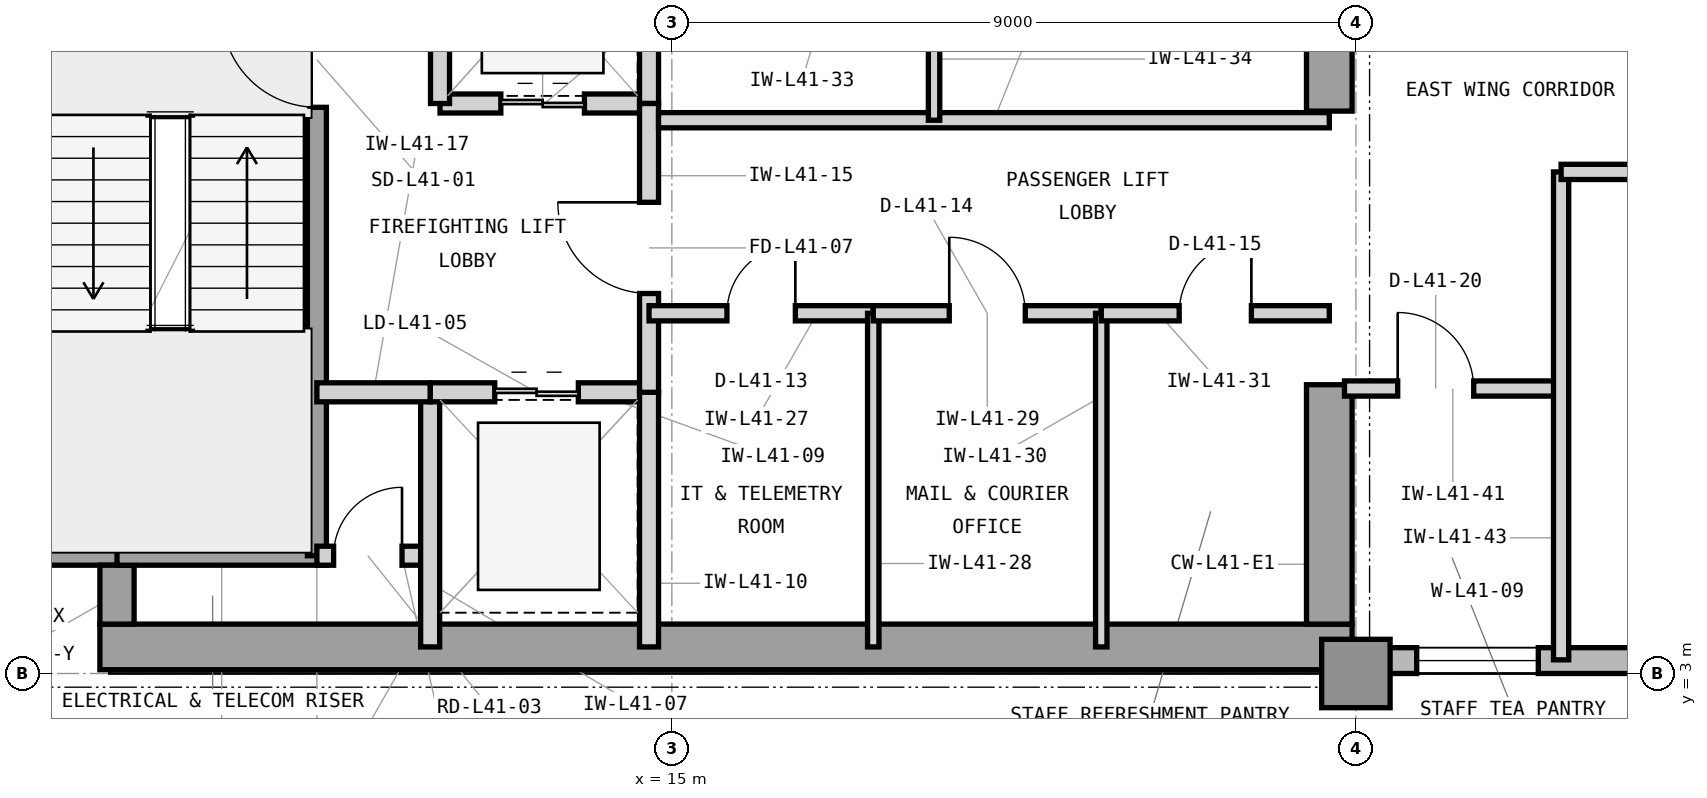
"""IFC4 building model, lengths in metres.
Left out: names, types, materials, properties, quantities, classifications, styles, units other than length and angle.
Written with IfcOpenShell. Run it as: python <this file> out.ifc"""

import sys

from ifc_helpers import new_model, si_unit, direction, frame, frame_2d, origin, origin_2d, place, context, subcontext, project, spatial, rectangle, extrude, element, fill, save


model = new_model("IFC4")
c1 = context("Model", 3, precision=1e-05, world=origin(), true_north=direction((0.0, 1.0)))
c2 = subcontext(c1, "Body", "Model", "MODEL_VIEW")
j1 = project(units=[si_unit("LENGTHUNIT", "METRE"), si_unit("PLANEANGLEUNIT", "RADIAN")], contexts=[c1])
p1 = place(None, origin())
s1 = spatial("IfcSite", under=j1, at=p1, CompositionType="ELEMENT")
p2 = place(p1, origin())
s2 = spatial("IfcBuilding", under=s1, at=p2, CompositionType="ELEMENT")
p3 = place(p2, frame((0.0, 0.0, 172.2)))
s3 = spatial("IfcBuildingStorey", under=s2, at=p3, CompositionType="ELEMENT", Elevation=172.2)
p4 = place(p3, frame((7.475, 3.35, 0.0), z_axis=(0.0, 0.0, 1.0), x_axis=(1.0, 0.0, 0.0)))
e1 = element("IfcWall", 1, at=p4, inside=s3, PredefinedType="SHEAR", context=c2, shape_type="SweptSolid", body=[
    extrude(rectangle(XDim=16.475, YDim=0.6, at=frame_2d((8.237, 0.0))), origin(), (0.0, 0.0, 1.0), 3.9),
])
p5 = place(p3, frame((23.65, 3.65, 0.0), z_axis=(0.0, 0.0, 1.0), x_axis=(0.0, 1.0, 0.0)))
e2 = element("IfcWall", 2, at=p5, inside=s3, PredefinedType="SHEAR", context=c2, shape_type="SweptSolid", body=[
    extrude(rectangle(XDim=3.15, YDim=0.6, at=frame_2d((1.575, 0.0))), origin(), (0.0, 0.0, 1.0), 3.9),
])
p6 = place(p3, frame((23.65, 10.4, 0.0), z_axis=(0.0, 0.0, 1.0), x_axis=(0.0, 1.0, 0.0)))
e3 = element("IfcWall", 3, at=p6, inside=s3, PredefinedType="SHEAR", context=c2, shape_type="SweptSolid", body=[
    extrude(rectangle(XDim=3.2, YDim=0.6, at=frame_2d((1.6, 0.0))), origin(), (0.0, 0.0, 1.0), 3.9),
])
p7 = place(p3, frame((6.65, 4.65, 0.0), z_axis=(0.0, 0.0, 1.0), x_axis=(1.0, 0.0, 0.0)))
e4 = element("IfcWall", 4, at=p7, inside=s3, PredefinedType="SHEAR", context=c2, shape_type="SweptSolid", body=[
    extrude(rectangle(XDim=1.275, YDim=0.45, at=frame_2d((0.638, 0.0))), origin(), (0.0, 0.0, 1.0), 3.9),
])
p8 = place(p3, frame((7.7, 3.65, 0.0), z_axis=(0.0, 0.0, 1.0), x_axis=(0.0, 1.0, 0.0)))
e5 = element("IfcWall", 5, at=p8, inside=s3, PredefinedType="SHEAR", context=c2, shape_type="SweptSolid", body=[
    extrude(rectangle(XDim=0.775, YDim=0.45, at=frame_2d((0.388, 0.0))), origin(), (0.0, 0.0, 1.0), 3.9),
])
p9 = place(p3, frame((24.0, 3.0, 0.0), z_axis=(0.0, 0.0, 1.0), x_axis=(1.0, 0.0, 0.0)))
e6 = element("IfcColumn", 6, at=p9, inside=s3, PredefinedType="COLUMN", context=c2, shape_type="SweptSolid", body=[
    extrude(rectangle(XDim=0.9, YDim=0.9, at=origin_2d()), origin(), (0.0, 0.0, 1.0), 3.9),
])
p10 = place(p3, frame((23.9, 3.17, 0.0), z_axis=(0.0, 0.0, 1.0), x_axis=(1.0, 0.0, 0.0)))
e7 = element("IfcWall", 7, at=p10, inside=s3, PredefinedType="STANDARD", context=c2, shape_type="SweptSolid", body=[
    extrude(rectangle(XDim=31.5, YDim=0.34, at=frame_2d((15.75, 0.0))), origin(), (0.0, 0.0, 1.0), 3.7),
])
p11 = place(p10, frame((5.6, 0.0, 0.9)))
e8 = element("IfcOpeningElement", 8, at=p11, cuts=e7, PredefinedType="OPENING", context=c2, shape_type="SweptSolid", body=[
    extrude(rectangle(XDim=2.3, YDim=2.2, at=frame_2d((1.15, 1.1))), frame((0.0, 0.18, 0.0), z_axis=(0.0, -1.0, 0.0), x_axis=(1.0, 0.0, 0.0)), (0.0, 0.0, 1.0), 0.36),
])
p12 = place(p10, frame((10.1, 0.0, 0.9)))
e9 = element("IfcOpeningElement", 9, at=p12, cuts=e7, PredefinedType="OPENING", context=c2, shape_type="SweptSolid", body=[
    extrude(rectangle(XDim=2.3, YDim=2.2, at=frame_2d((1.15, 1.1))), frame((0.0, 0.18, 0.0), z_axis=(0.0, -1.0, 0.0), x_axis=(1.0, 0.0, 0.0)), (0.0, 0.0, 1.0), 0.36),
])
p13 = place(p10, frame((19.1, 0.0, 0.9)))
e10 = element("IfcOpeningElement", 10, at=p13, cuts=e7, PredefinedType="OPENING", context=c2, shape_type="SweptSolid", body=[
    extrude(rectangle(XDim=2.3, YDim=2.2, at=frame_2d((1.15, 1.1))), frame((0.0, 0.18, 0.0), z_axis=(0.0, -1.0, 0.0), x_axis=(1.0, 0.0, 0.0)), (0.0, 0.0, 1.0), 0.36),
])
p14 = place(p10, frame((0.9, 0.0, 0.9)))
e11 = element("IfcOpeningElement", 11, at=p14, cuts=e7, PredefinedType="OPENING", context=c2, shape_type="SweptSolid", body=[
    extrude(rectangle(XDim=1.6, YDim=2.2, at=frame_2d((0.8, 1.1))), frame((0.0, 0.18, 0.0), z_axis=(0.0, -1.0, 0.0), x_axis=(1.0, 0.0, 0.0)), (0.0, 0.0, 1.0), 0.36),
])
p15 = place(p3, frame((7.7, 4.55, 0.0), z_axis=(0.0, 0.0, 1.0), x_axis=(1.0, 0.0, 0.0)))
e12 = element("IfcWall", 12, at=p15, inside=s3, PredefinedType="SHEAR", context=c2, shape_type="SweptSolid", body=[
    extrude(rectangle(XDim=2.755, YDim=0.25, at=frame_2d((1.377, 0.0))), origin(), (0.0, 0.0, 1.0), 3.9),
])
p16 = place(p3, frame((10.33, 4.55, 0.0), z_axis=(0.0, 0.0, 1.0), x_axis=(0.0, 1.0, 0.0)))
e13 = element("IfcWall", 13, at=p16, inside=s3, PredefinedType="SHEAR", context=c2, shape_type="SweptSolid", body=[
    extrude(rectangle(XDim=7.45, YDim=0.25, at=frame_2d((3.725, 0.0))), origin(), (0.0, 0.0, 1.0), 3.9),
])
p17 = place(p16, frame((5.9, 0.0, 0.0)))
e14 = element("IfcOpeningElement", 14, at=p17, cuts=e13, PredefinedType="OPENING", context=c2, shape_type="SweptSolid", body=[
    extrude(rectangle(XDim=1.25, YDim=2.2, at=frame_2d((0.625, 1.1))), frame((0.0, 0.135, 0.0), z_axis=(0.0, -1.0, 0.0), x_axis=(1.0, 0.0, 0.0)), (0.0, 0.0, 1.0), 0.27),
])
p18 = place(p3, frame((10.33, 4.55, 0.0), z_axis=(0.0, 0.0, 1.0), x_axis=(1.0, 0.0, 0.0)))
e15 = element("IfcWall", 15, at=p18, inside=s3, PredefinedType="PARTITIONING", context=c2, shape_type="SweptSolid", body=[
    extrude(rectangle(XDim=1.49, YDim=0.25, at=frame_2d((0.745, 0.0))), origin(), (0.0, 0.0, 1.0), 3.69),
])
p19 = place(p18, frame((0.22, 0.0, 0.0)))
e16 = element("IfcOpeningElement", 16, at=p19, cuts=e15, PredefinedType="OPENING", context=c2, shape_type="SweptSolid", body=[
    extrude(rectangle(XDim=0.9, YDim=2.1, at=frame_2d((0.45, 1.05))), frame((0.0, 0.135, 0.0), z_axis=(0.0, -1.0, 0.0), x_axis=(1.0, 0.0, 0.0)), (0.0, 0.0, 1.0), 0.27),
])
p20 = place(p3, frame((11.82, 3.35, 0.0), z_axis=(0.0, 0.0, 1.0), x_axis=(0.0, 1.0, 0.0)))
e17 = element("IfcWall", 17, at=p20, inside=s3, PredefinedType="PARTITIONING", context=c2, shape_type="SweptSolid", body=[
    extrude(rectangle(XDim=3.35, YDim=0.25, at=frame_2d((1.675, 0.0))), origin(), (0.0, 0.0, 1.0), 3.69),
])
p21 = place(p3, frame((11.82, 6.7, 0.0), z_axis=(0.0, 0.0, 1.0), x_axis=(1.0, 0.0, 0.0)))
e18 = element("IfcWall", 18, at=p21, inside=s3, PredefinedType="PARTITIONING", context=c2, shape_type="SweptSolid", body=[
    extrude(rectangle(XDim=2.88, YDim=0.25, at=frame_2d((1.44, 0.0))), origin(), (0.0, 0.0, 1.0), 3.283),
])
p22 = place(p21, frame((0.85, 0.0, 0.0)))
e19 = element("IfcOpeningElement", 19, at=p22, cuts=e18, PredefinedType="OPENING", context=c2, shape_type="SweptSolid", body=[
    extrude(rectangle(XDim=1.1, YDim=2.25, at=frame_2d((0.55, 1.125))), frame((0.0, 0.135, 0.0), z_axis=(0.0, -1.0, 0.0), x_axis=(1.0, 0.0, 0.0)), (0.0, 0.0, 1.0), 0.27),
])
p23 = place(p3, frame((14.7, 3.35, 0.0), z_axis=(0.0, 0.0, 1.0), x_axis=(0.0, 1.0, 0.0)))
e20 = element("IfcWall", 20, at=p23, inside=s3, PredefinedType="PARTITIONING", context=c2, shape_type="SweptSolid", body=[
    extrude(rectangle(XDim=3.35, YDim=0.25, at=frame_2d((1.675, 0.0))), origin(), (0.0, 0.0, 1.0), 3.69),
])
p24 = place(p3, frame((11.95, 10.5, 0.0), z_axis=(0.0, 0.0, 1.0), x_axis=(1.0, 0.0, 0.0)))
e21 = element("IfcWall", 21, at=p24, inside=s3, PredefinedType="PARTITIONING", context=c2, shape_type="SweptSolid", body=[
    extrude(rectangle(XDim=2.75, YDim=0.25, at=frame_2d((1.375, 0.0))), origin(), (0.0, 0.0, 1.0), 3.283),
])
p25 = place(p24, frame((0.8, 0.0, 0.0)))
e22 = element("IfcOpeningElement", 22, at=p25, cuts=e21, PredefinedType="OPENING", context=c2, shape_type="SweptSolid", body=[
    extrude(rectangle(XDim=1.1, YDim=2.25, at=frame_2d((0.55, 1.125))), frame((0.0, 0.135, 0.0), z_axis=(0.0, -1.0, 0.0), x_axis=(1.0, 0.0, 0.0)), (0.0, 0.0, 1.0), 0.27),
])
for number, where, z_axis, x_axis in (
    (23, (11.95, 10.5, 0.0), (0.0, 0.0, 1.0), (0.0, 1.0, 0.0)),
    (24, (14.7, 10.5, 0.0), (0.0, 0.0, 1.0), (0.0, 1.0, 0.0)),
):
    element("IfcWall", number, at=place(p3, frame(where, z_axis=z_axis, x_axis=x_axis)), inside=s3, PredefinedType="PARTITIONING", context=c2, shape_type="SweptSolid", body=[
        extrude(rectangle(XDim=3.0, YDim=0.25, at=frame_2d((1.5, 0.0))), origin(), (0.0, 0.0, 1.0), 3.69),
    ])
p26 = place(p3, frame((14.7, 6.7, 0.0), z_axis=(0.0, 0.0, 1.0), x_axis=(0.0, 1.0, 0.0)))
e25 = element("IfcWall", 25, at=p26, inside=s3, PredefinedType="PARTITIONING", context=c2, shape_type="SweptSolid", body=[
    extrude(rectangle(XDim=3.8, YDim=0.25, at=frame_2d((1.9, 0.0))), origin(), (0.0, 0.0, 1.0), 3.69),
])
p27 = place(p26, frame((1.3, 0.0, 0.0)))
e26 = element("IfcOpeningElement", 26, at=p27, cuts=e25, PredefinedType="OPENING", context=c2, shape_type="SweptSolid", body=[
    extrude(rectangle(XDim=1.2, YDim=2.2, at=frame_2d((0.6, 1.1))), frame((0.0, 0.135, 0.0), z_axis=(0.0, -1.0, 0.0), x_axis=(1.0, 0.0, 0.0)), (0.0, 0.0, 1.0), 0.27),
])
p28 = place(p3, frame((10.33, 6.7, 0.0), z_axis=(0.0, 0.0, 1.0), x_axis=(1.0, 0.0, 0.0)))
e27 = element("IfcWall", 27, at=p28, inside=s3, PredefinedType="PARTITIONING", context=c2, shape_type="SweptSolid", body=[
    extrude(rectangle(XDim=1.49, YDim=0.25, at=frame_2d((0.745, 0.0))), origin(), (0.0, 0.0, 1.0), 3.283),
])
p29 = place(p3, frame((14.7, 7.74, 0.0), z_axis=(0.0, 0.0, 1.0), x_axis=(1.0, 0.0, 0.0)))
e28 = element("IfcWall", 28, at=p29, inside=s3, PredefinedType="PARTITIONING", context=c2, shape_type="SweptSolid", body=[
    extrude(rectangle(XDim=2.95, YDim=0.2, at=frame_2d((1.475, 0.0))), origin(), (0.0, 0.0, 1.0), 3.69),
])
p30 = place(p29, frame((1.025, 0.0, 0.0)))
e29 = element("IfcOpeningElement", 29, at=p30, cuts=e28, PredefinedType="OPENING", context=c2, shape_type="SweptSolid", body=[
    extrude(rectangle(XDim=0.9, YDim=2.1, at=frame_2d((0.45, 1.05))), frame((0.0, 0.11, 0.0), z_axis=(0.0, -1.0, 0.0), x_axis=(1.0, 0.0, 0.0)), (0.0, 0.0, 1.0), 0.22),
])
p31 = place(p3, frame((17.65, 3.35, 0.0), z_axis=(0.0, 0.0, 1.0), x_axis=(0.0, 1.0, 0.0)))
e30 = element("IfcWall", 30, at=p31, inside=s3, PredefinedType="PARTITIONING", context=c2, shape_type="SweptSolid", body=[
    extrude(rectangle(XDim=4.39, YDim=0.15, at=frame_2d((2.195, 0.0))), origin(), (0.0, 0.0, 1.0), 3.69),
])
p32 = place(p3, frame((17.65, 7.74, 0.0), z_axis=(0.0, 0.0, 1.0), x_axis=(1.0, 0.0, 0.0)))
e31 = element("IfcWall", 31, at=p32, inside=s3, PredefinedType="PARTITIONING", context=c2, shape_type="SweptSolid", body=[
    extrude(rectangle(XDim=3.0, YDim=0.2, at=frame_2d((1.5, 0.0))), origin(), (0.0, 0.0, 1.0), 3.69),
])
p33 = place(p32, frame((1.0, 0.0, 0.0)))
e32 = element("IfcOpeningElement", 32, at=p33, cuts=e31, PredefinedType="OPENING", context=c2, shape_type="SweptSolid", body=[
    extrude(rectangle(XDim=1.0, YDim=2.15, at=frame_2d((0.5, 1.075))), frame((0.0, 0.11, 0.0), z_axis=(0.0, -1.0, 0.0), x_axis=(1.0, 0.0, 0.0)), (0.0, 0.0, 1.0), 0.22),
])
p34 = place(p3, frame((20.65, 3.35, 0.0), z_axis=(0.0, 0.0, 1.0), x_axis=(0.0, 1.0, 0.0)))
e33 = element("IfcWall", 33, at=p34, inside=s3, PredefinedType="PARTITIONING", context=c2, shape_type="SweptSolid", body=[
    extrude(rectangle(XDim=4.39, YDim=0.15, at=frame_2d((2.195, 0.0))), origin(), (0.0, 0.0, 1.0), 3.69),
])
p35 = place(p3, frame((20.65, 7.74, 0.0), z_axis=(0.0, 0.0, 1.0), x_axis=(1.0, 0.0, 0.0)))
e34 = element("IfcWall", 34, at=p35, inside=s3, PredefinedType="PARTITIONING", context=c2, shape_type="SweptSolid", body=[
    extrude(rectangle(XDim=3.0, YDim=0.2, at=frame_2d((1.5, 0.0))), origin(), (0.0, 0.0, 1.0), 3.69),
])
p36 = place(p35, frame((1.025, 0.0, 0.0)))
e35 = element("IfcOpeningElement", 35, at=p36, cuts=e34, PredefinedType="OPENING", context=c2, shape_type="SweptSolid", body=[
    extrude(rectangle(XDim=0.95, YDim=2.1, at=frame_2d((0.475, 1.05))), frame((0.0, 0.11, 0.0), z_axis=(0.0, -1.0, 0.0), x_axis=(1.0, 0.0, 0.0)), (0.0, 0.0, 1.0), 0.22),
])
p37 = place(p3, frame((14.825, 10.28, 0.0), z_axis=(0.0, 0.0, 1.0), x_axis=(1.0, 0.0, 0.0)))
e36 = element("IfcWall", 36, at=p37, inside=s3, PredefinedType="PARTITIONING", context=c2, shape_type="SweptSolid", body=[
    extrude(rectangle(XDim=8.825, YDim=0.2, at=frame_2d((4.413, 0.0))), origin(), (0.0, 0.0, 1.0), 3.69),
])
p38 = place(p3, frame((18.45, 10.28, 0.0), z_axis=(0.0, 0.0, 1.0), x_axis=(0.0, 1.0, 0.0)))
e37 = element("IfcWall", 37, at=p38, inside=s3, PredefinedType="PARTITIONING", context=c2, shape_type="SweptSolid", body=[
    extrude(rectangle(XDim=3.22, YDim=0.15, at=frame_2d((1.61, 0.0))), origin(), (0.0, 0.0, 1.0), 3.69),
])
p39 = place(p3, frame((23.85, 6.75, 0.0), z_axis=(0.0, 0.0, 1.0), x_axis=(1.0, 0.0, 0.0)))
e38 = element("IfcWall", 38, at=p39, inside=s3, PredefinedType="PARTITIONING", context=c2, shape_type="SweptSolid", body=[
    extrude(rectangle(XDim=2.85, YDim=0.2, at=frame_2d((1.425, 0.0))), origin(), (0.0, 0.0, 1.0), 3.69),
])
p40 = place(p39, frame((0.7, 0.0, 0.0)))
e39 = element("IfcOpeningElement", 39, at=p40, cuts=e38, PredefinedType="OPENING", context=c2, shape_type="SweptSolid", body=[
    extrude(rectangle(XDim=1.0, YDim=2.15, at=frame_2d((0.5, 1.075))), frame((0.0, 0.11, 0.0), z_axis=(0.0, -1.0, 0.0), x_axis=(1.0, 0.0, 0.0)), (0.0, 0.0, 1.0), 0.22),
])
p41 = place(p3, frame((26.7, 3.18, 0.0), z_axis=(0.0, 0.0, 1.0), x_axis=(0.0, 1.0, 0.0)))
e40 = element("IfcWall", 40, at=p41, inside=s3, PredefinedType="PARTITIONING", context=c2, shape_type="SweptSolid", body=[
    extrude(rectangle(XDim=6.42, YDim=0.2, at=frame_2d((3.21, 0.0))), origin(), (0.0, 0.0, 1.0), 3.69),
])
p42 = place(p3, frame((26.7, 9.6, 0.0), z_axis=(0.0, 0.0, 1.0), x_axis=(1.0, 0.0, 0.0)))
e41 = element("IfcWall", 41, at=p42, inside=s3, PredefinedType="PARTITIONING", context=c2, shape_type="SweptSolid", body=[
    extrude(rectangle(XDim=12.0, YDim=0.2, at=frame_2d((6.0, 0.0))), origin(), (0.0, 0.0, 1.0), 3.69),
])
p43 = place(p42, frame((5.5, 0.0, 0.0)))
e42 = element("IfcOpeningElement", 42, at=p43, cuts=e41, PredefinedType="OPENING", context=c2, shape_type="SweptSolid", body=[
    extrude(rectangle(XDim=1.0, YDim=2.15, at=frame_2d((0.5, 1.075))), frame((0.0, 0.11, 0.0), z_axis=(0.0, -1.0, 0.0), x_axis=(1.0, 0.0, 0.0)), (0.0, 0.0, 1.0), 0.22),
])
p44 = place(p17, origin())
e43 = element("IfcDoor", 43, at=p44, inside=s3, OperationType="SINGLE_SWING_RIGHT", PredefinedType="DOOR", context=c2, shape_type="SweptSolid", body=[
    extrude(rectangle(XDim=1.25, YDim=2.2, at=frame_2d((0.625, 1.1))), frame((0.0, 0.025, 0.0), z_axis=(0.0, -1.0, 0.0), x_axis=(1.0, 0.0, 0.0)), (0.0, 0.0, 1.0), 0.05),
])
fill(e14, e43)
p45 = place(p19, origin())
e44 = element("IfcDoor", 44, at=p45, inside=s3, OperationType="SINGLE_SWING_RIGHT", PredefinedType="TRAPDOOR", context=c2, shape_type="SweptSolid", body=[
    extrude(rectangle(XDim=0.9, YDim=2.1, at=frame_2d((0.45, 1.05))), frame((0.0, 0.025, 0.0), z_axis=(0.0, -1.0, 0.0), x_axis=(1.0, 0.0, 0.0)), (0.0, 0.0, 1.0), 0.05),
])
fill(e16, e44)
p46 = place(p22, origin())
e45 = element("IfcDoor", 45, at=p46, inside=s3, OperationType="DOUBLE_DOOR_SLIDING", PredefinedType="DOOR", context=c2, shape_type="SweptSolid", body=[
    extrude(rectangle(XDim=1.1, YDim=2.25, at=frame_2d((0.55, 1.125))), frame((0.0, 0.025, 0.0), z_axis=(0.0, -1.0, 0.0), x_axis=(1.0, 0.0, 0.0)), (0.0, 0.0, 1.0), 0.05),
])
fill(e19, e45)
p47 = place(p25, origin())
e46 = element("IfcDoor", 46, at=p47, inside=s3, OperationType="DOUBLE_DOOR_SLIDING", PredefinedType="DOOR", context=c2, shape_type="SweptSolid", body=[
    extrude(rectangle(XDim=1.1, YDim=2.25, at=frame_2d((0.55, 1.125))), frame((0.0, 0.025, 0.0), z_axis=(0.0, -1.0, 0.0), x_axis=(1.0, 0.0, 0.0)), (0.0, 0.0, 1.0), 0.05),
])
fill(e22, e46)
p48 = place(p27, origin())
e47 = element("IfcDoor", 47, at=p48, inside=s3, OperationType="SINGLE_SWING_RIGHT", PredefinedType="DOOR", context=c2, shape_type="SweptSolid", body=[
    extrude(rectangle(XDim=1.2, YDim=2.2, at=frame_2d((0.6, 1.1))), frame((0.0, 0.025, 0.0), z_axis=(0.0, -1.0, 0.0), x_axis=(1.0, 0.0, 0.0)), (0.0, 0.0, 1.0), 0.05),
])
fill(e26, e47)
p49 = place(p30, origin())
e48 = element("IfcDoor", 48, at=p49, inside=s3, OperationType="SINGLE_SWING_RIGHT", PredefinedType="TRAPDOOR", context=c2, shape_type="SweptSolid", body=[
    extrude(rectangle(XDim=0.9, YDim=2.1, at=frame_2d((0.45, 1.05))), frame((0.0, 0.025, 0.0), z_axis=(0.0, -1.0, 0.0), x_axis=(1.0, 0.0, 0.0)), (0.0, 0.0, 1.0), 0.05),
])
fill(e29, e48)
p50 = place(p33, origin())
e49 = element("IfcDoor", 49, at=p50, inside=s3, OperationType="SINGLE_SWING_LEFT", PredefinedType="DOOR", context=c2, shape_type="SweptSolid", body=[
    extrude(rectangle(XDim=1.0, YDim=2.15, at=frame_2d((0.5, 1.075))), frame((0.0, 0.025, 0.0), z_axis=(0.0, -1.0, 0.0), x_axis=(1.0, 0.0, 0.0)), (0.0, 0.0, 1.0), 0.05),
])
fill(e32, e49)
p51 = place(p36, origin())
e50 = element("IfcDoor", 50, at=p51, inside=s3, OperationType="SINGLE_SWING_RIGHT", PredefinedType="DOOR", context=c2, shape_type="SweptSolid", body=[
    extrude(rectangle(XDim=0.95, YDim=2.1, at=frame_2d((0.475, 1.05))), frame((0.0, 0.025, 0.0), z_axis=(0.0, -1.0, 0.0), x_axis=(1.0, 0.0, 0.0)), (0.0, 0.0, 1.0), 0.05),
])
fill(e35, e50)
p52 = place(p40, origin())
e51 = element("IfcDoor", 51, at=p52, inside=s3, OperationType="SINGLE_SWING_LEFT", PredefinedType="DOOR", context=c2, shape_type="SweptSolid", body=[
    extrude(rectangle(XDim=1.0, YDim=2.15, at=frame_2d((0.5, 1.075))), frame((0.0, 0.025, 0.0), z_axis=(0.0, -1.0, 0.0), x_axis=(1.0, 0.0, 0.0)), (0.0, 0.0, 1.0), 0.05),
])
fill(e39, e51)
p53 = place(p14, origin())
e52 = element("IfcWindow", 52, at=p53, inside=s3, PartitioningType="SINGLE_PANEL", PredefinedType="WINDOW", context=c2, shape_type="SweptSolid", body=[
    extrude(rectangle(XDim=1.6, YDim=2.2, at=frame_2d((0.8, 1.1))), frame((0.0, 0.11, 0.0), z_axis=(0.0, -1.0, 0.0), x_axis=(1.0, 0.0, 0.0)), (0.0, 0.0, 1.0), 0.06),
])
fill(e11, e52)
save(model, sys.argv[1])
